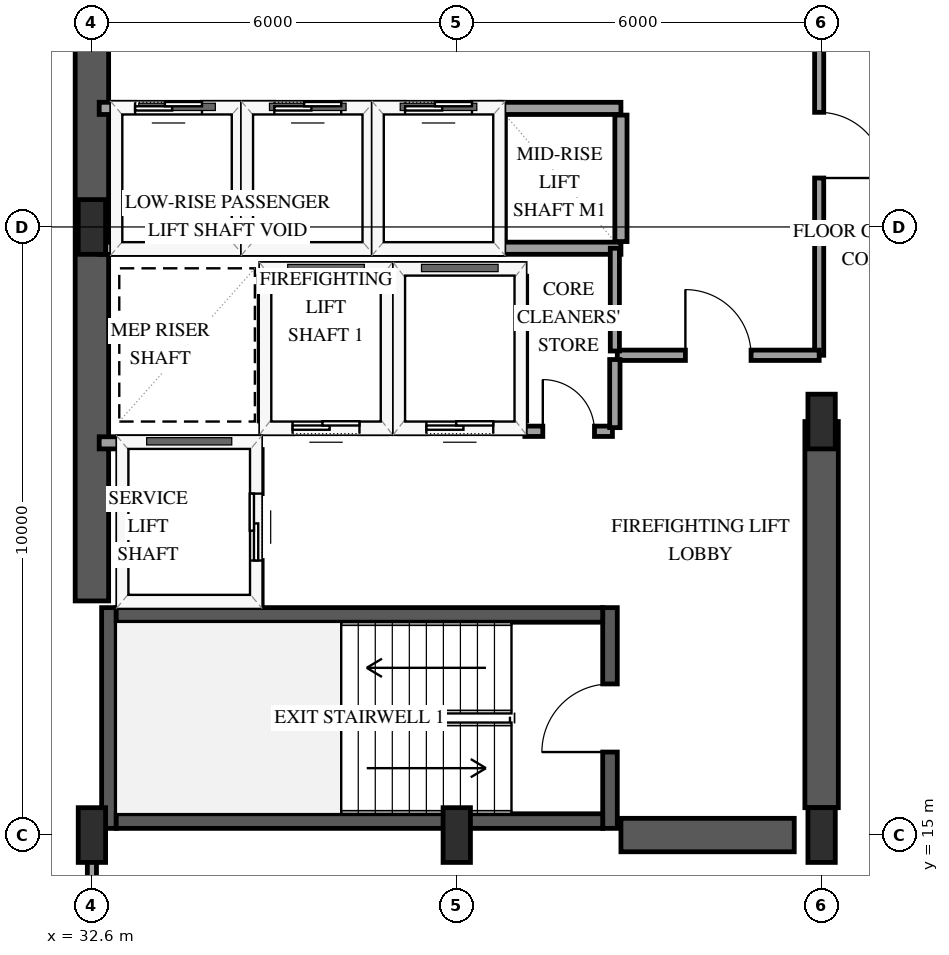
"""IFC4 building model, lengths in metres.
Left out: names, types, materials, properties, quantities, classifications, styles, units other than length and angle.
Written with IfcOpenShell. Run it as: python <this file> out.ifc"""

import sys

from ifc_helpers import new_model, si_unit, direction, frame, frame_2d, origin, origin_2d, place, context, subcontext, project, spatial, rectangle, extrude, element, fill, save


model = new_model("IFC4")
c1 = context("Model", 3, precision=1e-05, world=origin(), true_north=direction((0.0, 1.0)))
c2 = subcontext(c1, "Body", "Model", "MODEL_VIEW")
j1 = project(units=[si_unit("LENGTHUNIT", "METRE"), si_unit("PLANEANGLEUNIT", "RADIAN")], contexts=[c1])
p1 = place(None, origin())
s1 = spatial("IfcSite", under=j1, at=p1, CompositionType="ELEMENT")
p2 = place(p1, origin())
s2 = spatial("IfcBuilding", under=s1, at=p2, CompositionType="ELEMENT")
p3 = place(p2, frame((0.0, 0.0, 130.3)))
s3 = spatial("IfcBuildingStorey", under=s2, at=p3, CompositionType="ELEMENT", Elevation=130.3)
p4 = place(p3, frame((32.88, 15.11, 0.0), z_axis=(0.0, 0.0, 1.0), x_axis=(0.0, 1.0, 0.0)))
e1 = element("IfcWall", 1, at=p4, inside=s3, PredefinedType="SHEAR", context=c2, shape_type="SweptSolid", body=[
    extrude(rectangle(XDim=3.63, YDim=0.24, at=frame_2d((1.815, 0.0))), origin(), (0.0, 0.0, 1.0), 3.9),
])
p5 = place(p3, frame((41.12, 15.11, 0.0), z_axis=(0.0, 0.0, 1.0), x_axis=(0.0, 1.0, 0.0)))
e2 = element("IfcWall", 2, at=p5, inside=s3, PredefinedType="SHEAR", context=c2, shape_type="SweptSolid", body=[
    extrude(rectangle(XDim=3.63, YDim=0.24, at=frame_2d((1.815, 0.0))), origin(), (0.0, 0.0, 1.0), 3.9),
])
p6 = place(p5, frame((1.255, 0.0, 0.0)))
e3 = element("IfcOpeningElement", 3, at=p6, cuts=e2, PredefinedType="OPENING", context=c2, shape_type="SweptSolid", body=[
    extrude(rectangle(XDim=1.12, YDim=2.15, at=frame_2d((0.56, 1.075))), frame((0.0, 0.13, 0.0), z_axis=(0.0, -1.0, 0.0), x_axis=(1.0, 0.0, 0.0)), (0.0, 0.0, 1.0), 0.26),
])
for number, where, z_axis, x_axis in (
    (4, (33.0, 15.23, 0.0), (0.0, 0.0, 1.0), (1.0, 0.0, 0.0)),
    (5, (33.0, 18.62, 0.0), (0.0, 0.0, 1.0), (1.0, 0.0, 0.0)),
):
    element("IfcWall", number, at=place(p3, frame(where, z_axis=z_axis, x_axis=x_axis)), inside=s3, PredefinedType="SHEAR", context=c2, shape_type="SweptSolid", body=[
        extrude(rectangle(XDim=8.0, YDim=0.24, at=frame_2d((4.0, 0.0))), origin(), (0.0, 0.0, 1.0), 3.9),
    ])
p7 = place(p3, frame((32.6, 18.85, 0.0), z_axis=(0.0, 0.0, 1.0), x_axis=(0.0, 1.0, 0.0)))
e6 = element("IfcWall", 6, at=p7, inside=s3, PredefinedType="SHEAR", context=c2, shape_type="SweptSolid", body=[
    extrude(rectangle(XDim=12.3, YDim=0.55, at=frame_2d((6.15, 0.0))), origin(), (0.0, 0.0, 1.0), 3.9),
])
p8 = place(p3, frame((41.3, 15.0, 0.0), z_axis=(0.0, 0.0, 1.0), x_axis=(1.0, 0.0, 0.0)))
e7 = element("IfcWall", 7, at=p8, inside=s3, PredefinedType="SHEAR", context=c2, shape_type="SweptSolid", body=[
    extrude(rectangle(XDim=2.85, YDim=0.55, at=frame_2d((1.425, 0.0))), origin(), (0.0, 0.0, 1.0), 3.9),
])
p9 = place(p3, frame((44.6, 15.45, 0.0), z_axis=(0.0, 0.0, 1.0), x_axis=(0.0, 1.0, 0.0)))
e8 = element("IfcWall", 8, at=p9, inside=s3, PredefinedType="SHEAR", context=c2, shape_type="SweptSolid", body=[
    extrude(rectangle(XDim=6.35, YDim=0.55, at=frame_2d((3.175, 0.0))), origin(), (0.0, 0.0, 1.0), 3.9),
])
for number, where, z_axis, x_axis in (
    (9, (32.6, 15.0, 0.0), (0.0, 0.0, 1.0), (1.0, 0.0, 0.0)),
    (10, (32.6, 25.0, 0.0), (0.0, 0.0, 1.0), (1.0, 0.0, 0.0)),
    (11, (38.6, 15.0, 0.0), (0.0, 0.0, 1.0), (1.0, 0.0, 0.0)),
    (12, (44.6, 15.0, 0.0), (0.0, 0.0, 1.0), (1.0, 0.0, 0.0)),
    (13, (44.6, 21.8, 0.0), (0.0, 0.0, 1.0), (1.0, 0.0, 0.0)),
):
    element("IfcColumn", number, at=place(p3, frame(where, z_axis=z_axis, x_axis=x_axis)), inside=s3, PredefinedType="PILASTER", context=c2, shape_type="SweptSolid", body=[
        extrude(rectangle(XDim=0.45, YDim=0.9, at=origin_2d()), origin(), (0.0, 0.0, 1.0), 3.9),
    ])
p10 = place(p3, frame((35.45, 21.7, 0.0), z_axis=(0.0, 0.0, 1.0), x_axis=(1.0, 0.0, 0.0)))
e14 = element("IfcWall", 14, at=p10, inside=s3, PredefinedType="SOLIDWALL", context=c2, shape_type="SweptSolid", body=[
    extrude(rectangle(XDim=2.0, YDim=0.2, at=frame_2d((1.0, 0.0))), origin(), (0.0, 0.0, 1.0), 3.56),
])
p11 = place(p10, frame((0.45, 0.0, 0.0)))
e15 = element("IfcOpeningElement", 15, at=p11, cuts=e14, PredefinedType="OPENING", context=c2, shape_type="SweptSolid", body=[
    extrude(rectangle(XDim=1.1, YDim=2.15, at=frame_2d((0.55, 1.075))), frame((0.0, 0.11, 0.0), z_axis=(0.0, -1.0, 0.0), x_axis=(1.0, 0.0, 0.0)), (0.0, 0.0, 1.0), 0.22),
])
p12 = place(p3, frame((35.45, 24.3, 0.0), z_axis=(0.0, 0.0, 1.0), x_axis=(1.0, 0.0, 0.0)))
e16 = element("IfcWall", 16, at=p12, inside=s3, PredefinedType="SOLIDWALL", context=c2, shape_type="SweptSolid", body=[
    extrude(rectangle(XDim=2.0, YDim=0.2, at=frame_2d((1.0, 0.0))), origin(), (0.0, 0.0, 1.0), 3.56),
])
for number, where, z_axis, x_axis in (
    (17, (35.45, 21.81, 0.0), (0.0, 0.0, 1.0), (0.0, 1.0, 0.0)),
    (18, (37.45, 21.81, 0.0), (0.0, 0.0, 1.0), (0.0, 1.0, 0.0)),
):
    element("IfcWall", number, at=place(p3, frame(where, z_axis=z_axis, x_axis=x_axis)), inside=s3, PredefinedType="SOLIDWALL", context=c2, shape_type="SweptSolid", body=[
        extrude(rectangle(XDim=2.38, YDim=0.2, at=frame_2d((1.19, 0.0))), origin(), (0.0, 0.0, 1.0), 3.56),
    ])
p13 = place(p3, frame((37.65, 21.7, 0.0), z_axis=(0.0, 0.0, 1.0), x_axis=(1.0, 0.0, 0.0)))
e19 = element("IfcWall", 19, at=p13, inside=s3, PredefinedType="SOLIDWALL", context=c2, shape_type="SweptSolid", body=[
    extrude(rectangle(XDim=2.0, YDim=0.2, at=frame_2d((1.0, 0.0))), origin(), (0.0, 0.0, 1.0), 3.56),
])
p14 = place(p13, frame((0.45, 0.0, 0.0)))
e20 = element("IfcOpeningElement", 20, at=p14, cuts=e19, PredefinedType="OPENING", context=c2, shape_type="SweptSolid", body=[
    extrude(rectangle(XDim=1.1, YDim=2.15, at=frame_2d((0.55, 1.075))), frame((0.0, 0.11, 0.0), z_axis=(0.0, -1.0, 0.0), x_axis=(1.0, 0.0, 0.0)), (0.0, 0.0, 1.0), 0.22),
])
p15 = place(p3, frame((37.65, 24.3, 0.0), z_axis=(0.0, 0.0, 1.0), x_axis=(1.0, 0.0, 0.0)))
e21 = element("IfcWall", 21, at=p15, inside=s3, PredefinedType="SOLIDWALL", context=c2, shape_type="SweptSolid", body=[
    extrude(rectangle(XDim=2.0, YDim=0.2, at=frame_2d((1.0, 0.0))), origin(), (0.0, 0.0, 1.0), 3.56),
])
p16 = place(p3, frame((39.65, 21.81, 0.0), z_axis=(0.0, 0.0, 1.0), x_axis=(0.0, 1.0, 0.0)))
e22 = element("IfcWall", 22, at=p16, inside=s3, PredefinedType="SOLIDWALL", context=c2, shape_type="SweptSolid", body=[
    extrude(rectangle(XDim=2.38, YDim=0.2, at=frame_2d((1.19, 0.0))), origin(), (0.0, 0.0, 1.0), 3.56),
])
p17 = place(p3, frame((32.72, 21.45, 0.0), z_axis=(0.0, 0.0, 1.0), x_axis=(1.0, 0.0, 0.0)))
e23 = element("IfcWall", 23, at=p17, inside=s3, PredefinedType="SOLIDWALL", context=c2, shape_type="SweptSolid", body=[
    extrude(rectangle(XDim=2.58, YDim=0.2, at=frame_2d((1.29, 0.0))), origin(), (0.0, 0.0, 1.0), 3.56),
])
p18 = place(p3, frame((35.3, 18.79, 0.0), z_axis=(0.0, 0.0, 1.0), x_axis=(0.0, 1.0, 0.0)))
e24 = element("IfcWall", 24, at=p18, inside=s3, PredefinedType="SOLIDWALL", context=c2, shape_type="SweptSolid", body=[
    extrude(rectangle(XDim=2.55, YDim=0.2, at=frame_2d((1.275, 0.0))), origin(), (0.0, 0.0, 1.0), 3.56),
])
p19 = place(p18, frame((0.725, 0.0, 0.0)))
e25 = element("IfcOpeningElement", 25, at=p19, cuts=e24, PredefinedType="OPENING", context=c2, shape_type="SweptSolid", body=[
    extrude(rectangle(XDim=1.1, YDim=2.15, at=frame_2d((0.55, 1.075))), frame((0.0, 0.11, 0.0), z_axis=(0.0, -1.0, 0.0), x_axis=(1.0, 0.0, 0.0)), (0.0, 0.0, 1.0), 0.22),
])
p20 = place(p3, frame((32.72, 24.65, 0.0), z_axis=(0.0, 0.0, 1.0), x_axis=(1.0, 0.0, 0.0)))
e26 = element("IfcWall", 26, at=p20, inside=s3, PredefinedType="SOLIDWALL", context=c2, shape_type="SweptSolid", body=[
    extrude(rectangle(XDim=2.28, YDim=0.2, at=frame_2d((1.14, 0.0))), origin(), (0.0, 0.0, 1.0), 3.56),
])
p21 = place(p3, frame((32.72, 26.95, 0.0), z_axis=(0.0, 0.0, 1.0), x_axis=(1.0, 0.0, 0.0)))
e27 = element("IfcWall", 27, at=p21, inside=s3, PredefinedType="SOLIDWALL", context=c2, shape_type="SweptSolid", body=[
    extrude(rectangle(XDim=2.28, YDim=0.2, at=frame_2d((1.14, 0.0))), origin(), (0.0, 0.0, 1.0), 3.56),
])
p22 = place(p21, frame((0.59, 0.0, 0.0)))
e28 = element("IfcOpeningElement", 28, at=p22, cuts=e27, PredefinedType="OPENING", context=c2, shape_type="SweptSolid", body=[
    extrude(rectangle(XDim=1.1, YDim=2.15, at=frame_2d((0.55, 1.075))), frame((0.0, 0.11, 0.0), z_axis=(0.0, -1.0, 0.0), x_axis=(1.0, 0.0, 0.0)), (0.0, 0.0, 1.0), 0.22),
])
p23 = place(p3, frame((35.0, 24.76, 0.0), z_axis=(0.0, 0.0, 1.0), x_axis=(0.0, 1.0, 0.0)))
e29 = element("IfcWall", 29, at=p23, inside=s3, PredefinedType="SOLIDWALL", context=c2, shape_type="SweptSolid", body=[
    extrude(rectangle(XDim=2.08, YDim=0.2, at=frame_2d((1.04, 0.0))), origin(), (0.0, 0.0, 1.0), 3.56),
])
p24 = place(p3, frame((35.15, 24.65, 0.0), z_axis=(0.0, 0.0, 1.0), x_axis=(1.0, 0.0, 0.0)))
e30 = element("IfcWall", 30, at=p24, inside=s3, PredefinedType="SOLIDWALL", context=c2, shape_type="SweptSolid", body=[
    extrude(rectangle(XDim=2.0, YDim=0.2, at=frame_2d((1.0, 0.0))), origin(), (0.0, 0.0, 1.0), 3.56),
])
p25 = place(p3, frame((35.15, 26.95, 0.0), z_axis=(0.0, 0.0, 1.0), x_axis=(1.0, 0.0, 0.0)))
e31 = element("IfcWall", 31, at=p25, inside=s3, PredefinedType="SOLIDWALL", context=c2, shape_type="SweptSolid", body=[
    extrude(rectangle(XDim=2.0, YDim=0.2, at=frame_2d((1.0, 0.0))), origin(), (0.0, 0.0, 1.0), 3.56),
])
p26 = place(p25, frame((0.45, 0.0, 0.0)))
e32 = element("IfcOpeningElement", 32, at=p26, cuts=e31, PredefinedType="OPENING", context=c2, shape_type="SweptSolid", body=[
    extrude(rectangle(XDim=1.1, YDim=2.15, at=frame_2d((0.55, 1.075))), frame((0.0, 0.11, 0.0), z_axis=(0.0, -1.0, 0.0), x_axis=(1.0, 0.0, 0.0)), (0.0, 0.0, 1.0), 0.22),
])
p27 = place(p3, frame((37.15, 24.76, 0.0), z_axis=(0.0, 0.0, 1.0), x_axis=(0.0, 1.0, 0.0)))
e33 = element("IfcWall", 33, at=p27, inside=s3, PredefinedType="SOLIDWALL", context=c2, shape_type="SweptSolid", body=[
    extrude(rectangle(XDim=2.08, YDim=0.2, at=frame_2d((1.04, 0.0))), origin(), (0.0, 0.0, 1.0), 3.56),
])
p28 = place(p3, frame((37.3, 24.65, 0.0), z_axis=(0.0, 0.0, 1.0), x_axis=(1.0, 0.0, 0.0)))
e34 = element("IfcWall", 34, at=p28, inside=s3, PredefinedType="SOLIDWALL", context=c2, shape_type="SweptSolid", body=[
    extrude(rectangle(XDim=2.0, YDim=0.2, at=frame_2d((1.0, 0.0))), origin(), (0.0, 0.0, 1.0), 3.56),
])
p29 = place(p3, frame((37.3, 26.95, 0.0), z_axis=(0.0, 0.0, 1.0), x_axis=(1.0, 0.0, 0.0)))
e35 = element("IfcWall", 35, at=p29, inside=s3, PredefinedType="SOLIDWALL", context=c2, shape_type="SweptSolid", body=[
    extrude(rectangle(XDim=2.0, YDim=0.2, at=frame_2d((1.0, 0.0))), origin(), (0.0, 0.0, 1.0), 3.56),
])
p30 = place(p29, frame((0.45, 0.0, 0.0)))
e36 = element("IfcOpeningElement", 36, at=p30, cuts=e35, PredefinedType="OPENING", context=c2, shape_type="SweptSolid", body=[
    extrude(rectangle(XDim=1.1, YDim=2.15, at=frame_2d((0.55, 1.075))), frame((0.0, 0.11, 0.0), z_axis=(0.0, -1.0, 0.0), x_axis=(1.0, 0.0, 0.0)), (0.0, 0.0, 1.0), 0.22),
])
p31 = place(p3, frame((39.3, 24.76, 0.0), z_axis=(0.0, 0.0, 1.0), x_axis=(0.0, 1.0, 0.0)))
e37 = element("IfcWall", 37, at=p31, inside=s3, PredefinedType="SOLIDWALL", context=c2, shape_type="SweptSolid", body=[
    extrude(rectangle(XDim=2.08, YDim=0.2, at=frame_2d((1.04, 0.0))), origin(), (0.0, 0.0, 1.0), 3.56),
])
for number, where, z_axis, x_axis in (
    (38, (39.3, 24.65, 0.0), (0.0, 0.0, 1.0), (1.0, 0.0, 0.0)),
    (39, (39.3, 26.95, 0.0), (0.0, 0.0, 1.0), (1.0, 0.0, 0.0)),
):
    element("IfcWall", number, at=place(p3, frame(where, z_axis=z_axis, x_axis=x_axis)), inside=s3, PredefinedType="SOLIDWALL", context=c2, shape_type="SweptSolid", body=[
        extrude(rectangle(XDim=2.0, YDim=0.2, at=frame_2d((1.0, 0.0))), origin(), (0.0, 0.0, 1.0), 3.56),
    ])
p32 = place(p3, frame((41.3, 24.76, 0.0), z_axis=(0.0, 0.0, 1.0), x_axis=(0.0, 1.0, 0.0)))
e40 = element("IfcWall", 40, at=p32, inside=s3, PredefinedType="SOLIDWALL", context=c2, shape_type="SweptSolid", body=[
    extrude(rectangle(XDim=2.08, YDim=0.2, at=frame_2d((1.04, 0.0))), origin(), (0.0, 0.0, 1.0), 3.56),
])
p33 = place(p3, frame((44.56, 29.8, 0.0), z_axis=(0.0, 0.0, 1.0), x_axis=(0.0, -1.0, 0.0)))
e41 = element("IfcWall", 41, at=p33, inside=s3, PredefinedType="PARTITIONING", context=c2, shape_type="SweptSolid", body=[
    extrude(rectangle(XDim=6.91, YDim=0.15, at=frame_2d((3.455, 0.0))), origin(), (0.0, 0.0, 1.0), 2.6),
])
p34 = place(p33, frame((2.915, 0.0, 0.0)))
e42 = element("IfcOpeningElement", 42, at=p34, cuts=e41, PredefinedType="OPENING", context=c2, shape_type="SweptSolid", body=[
    extrude(rectangle(XDim=1.08, YDim=2.15, at=frame_2d((0.54, 1.075))), frame((0.0, 0.085, 0.0), z_axis=(0.0, -1.0, 0.0), x_axis=(1.0, 0.0, 0.0)), (0.0, 0.0, 1.0), 0.17),
])
p35 = place(p3, frame((41.24, 22.89, 0.0), z_axis=(0.0, 0.0, 1.0), x_axis=(1.0, 0.0, 0.0)))
e43 = element("IfcWall", 43, at=p35, inside=s3, PredefinedType="PARTITIONING", context=c2, shape_type="SweptSolid", body=[
    extrude(rectangle(XDim=3.32, YDim=0.17, at=frame_2d((1.66, 0.0))), origin(), (0.0, 0.0, 1.0), 3.56),
])
p36 = place(p35, frame((1.12, 0.0, 0.0)))
e44 = element("IfcOpeningElement", 44, at=p36, cuts=e43, PredefinedType="OPENING", context=c2, shape_type="SweptSolid", body=[
    extrude(rectangle(XDim=1.08, YDim=2.15, at=frame_2d((0.54, 1.075))), frame((0.0, 0.095, 0.0), z_axis=(0.0, -1.0, 0.0), x_axis=(1.0, 0.0, 0.0)), (0.0, 0.0, 1.0), 0.19),
])
p37 = place(p3, frame((32.6, 12.38, 0.0), z_axis=(0.0, 0.0, 1.0), x_axis=(0.0, 1.0, 0.0)))
e45 = element("IfcWall", 45, at=p37, inside=s3, PredefinedType="PARTITIONING", context=c2, shape_type="SweptSolid", body=[
    extrude(rectangle(XDim=2.55, YDim=0.15, at=frame_2d((1.275, 0.0))), origin(), (0.0, 0.0, 1.0), 3.56),
])
p38 = place(p3, frame((41.2, 22.96, 0.0), z_axis=(0.0, 0.0, 1.0), x_axis=(0.0, 1.0, 0.0)))
e46 = element("IfcWall", 46, at=p38, inside=s3, PredefinedType="PARTITIONING", context=c2, shape_type="SweptSolid", body=[
    extrude(rectangle(XDim=1.69, YDim=0.15, at=frame_2d((0.845, 0.0))), origin(), (0.0, 0.0, 1.0), 3.56),
])
p39 = place(p3, frame((39.72, 21.64, 0.0), z_axis=(0.0, 0.0, 1.0), x_axis=(1.0, 0.0, 0.0)))
e47 = element("IfcWall", 47, at=p39, inside=s3, PredefinedType="PARTITIONING", context=c2, shape_type="SweptSolid", body=[
    extrude(rectangle(XDim=1.44, YDim=0.17, at=frame_2d((0.72, 0.0))), origin(), (0.0, 0.0, 1.0), 3.56),
])
p40 = place(p39, frame((0.295, 0.0, 0.0)))
e48 = element("IfcOpeningElement", 48, at=p40, cuts=e47, PredefinedType="OPENING", context=c2, shape_type="SweptSolid", body=[
    extrude(rectangle(XDim=0.85, YDim=2.1, at=frame_2d((0.425, 1.05))), frame((0.0, 0.095, 0.0), z_axis=(0.0, -1.0, 0.0), x_axis=(1.0, 0.0, 0.0)), (0.0, 0.0, 1.0), 0.19),
])
p41 = place(p3, frame((41.2, 21.7, 0.0), z_axis=(0.0, 0.0, 1.0), x_axis=(0.0, 1.0, 0.0)))
e49 = element("IfcWall", 49, at=p41, inside=s3, PredefinedType="PARTITIONING", context=c2, shape_type="SweptSolid", body=[
    extrude(rectangle(XDim=1.12, YDim=0.17, at=frame_2d((0.56, 0.0))), origin(), (0.0, 0.0, 1.0), 3.56),
])
p42 = place(p11, origin())
e50 = element("IfcDoor", 50, at=p42, inside=s3, OperationType="SLIDING_TO_LEFT", PredefinedType="DOOR", context=c2, shape_type="SweptSolid", body=[
    extrude(rectangle(XDim=1.1, YDim=2.15, at=frame_2d((0.55, 1.075))), frame((0.0, 0.025, 0.0), z_axis=(0.0, -1.0, 0.0), x_axis=(1.0, 0.0, 0.0)), (0.0, 0.0, 1.0), 0.05),
])
fill(e15, e50)
p43 = place(p14, origin())
e51 = element("IfcDoor", 51, at=p43, inside=s3, OperationType="SLIDING_TO_LEFT", PredefinedType="DOOR", context=c2, shape_type="SweptSolid", body=[
    extrude(rectangle(XDim=1.1, YDim=2.15, at=frame_2d((0.55, 1.075))), frame((0.0, 0.025, 0.0), z_axis=(0.0, -1.0, 0.0), x_axis=(1.0, 0.0, 0.0)), (0.0, 0.0, 1.0), 0.05),
])
fill(e20, e51)
p44 = place(p19, origin())
e52 = element("IfcDoor", 52, at=p44, inside=s3, OperationType="SLIDING_TO_LEFT", PredefinedType="DOOR", context=c2, shape_type="SweptSolid", body=[
    extrude(rectangle(XDim=1.1, YDim=2.15, at=frame_2d((0.55, 1.075))), frame((0.0, 0.025, 0.0), z_axis=(0.0, -1.0, 0.0), x_axis=(1.0, 0.0, 0.0)), (0.0, 0.0, 1.0), 0.05),
])
fill(e25, e52)
p45 = place(p22, origin())
e53 = element("IfcDoor", 53, at=p45, inside=s3, OperationType="SLIDING_TO_LEFT", PredefinedType="DOOR", context=c2, shape_type="SweptSolid", body=[
    extrude(rectangle(XDim=1.1, YDim=2.15, at=frame_2d((0.55, 1.075))), frame((0.0, 0.025, 0.0), z_axis=(0.0, -1.0, 0.0), x_axis=(1.0, 0.0, 0.0)), (0.0, 0.0, 1.0), 0.05),
])
fill(e28, e53)
p46 = place(p26, origin())
e54 = element("IfcDoor", 54, at=p46, inside=s3, OperationType="SLIDING_TO_LEFT", PredefinedType="DOOR", context=c2, shape_type="SweptSolid", body=[
    extrude(rectangle(XDim=1.1, YDim=2.15, at=frame_2d((0.55, 1.075))), frame((0.0, 0.025, 0.0), z_axis=(0.0, -1.0, 0.0), x_axis=(1.0, 0.0, 0.0)), (0.0, 0.0, 1.0), 0.05),
])
fill(e32, e54)
p47 = place(p30, origin())
e55 = element("IfcDoor", 55, at=p47, inside=s3, OperationType="SLIDING_TO_LEFT", PredefinedType="DOOR", context=c2, shape_type="SweptSolid", body=[
    extrude(rectangle(XDim=1.1, YDim=2.15, at=frame_2d((0.55, 1.075))), frame((0.0, 0.025, 0.0), z_axis=(0.0, -1.0, 0.0), x_axis=(1.0, 0.0, 0.0)), (0.0, 0.0, 1.0), 0.05),
])
fill(e36, e55)
p48 = place(p6, origin())
e56 = element("IfcDoor", 56, at=p48, inside=s3, OperationType="SINGLE_SWING_LEFT", PredefinedType="DOOR", context=c2, shape_type="SweptSolid", body=[
    extrude(rectangle(XDim=1.12, YDim=2.15, at=frame_2d((0.56, 1.075))), frame((0.0, 0.025, 0.0), z_axis=(0.0, -1.0, 0.0), x_axis=(1.0, 0.0, 0.0)), (0.0, 0.0, 1.0), 0.05),
])
fill(e3, e56)
p49 = place(p34, origin())
e57 = element("IfcDoor", 57, at=p49, inside=s3, OperationType="SINGLE_SWING_RIGHT", PredefinedType="DOOR", context=c2, shape_type="SweptSolid", body=[
    extrude(rectangle(XDim=1.08, YDim=2.15, at=frame_2d((0.54, 1.075))), frame((0.0, 0.025, 0.0), z_axis=(0.0, -1.0, 0.0), x_axis=(1.0, 0.0, 0.0)), (0.0, 0.0, 1.0), 0.05),
])
fill(e42, e57)
p50 = place(p36, origin())
e58 = element("IfcDoor", 58, at=p50, inside=s3, OperationType="SINGLE_SWING_LEFT", PredefinedType="DOOR", context=c2, shape_type="SweptSolid", body=[
    extrude(rectangle(XDim=1.08, YDim=2.15, at=frame_2d((0.54, 1.075))), frame((0.0, 0.025, 0.0), z_axis=(0.0, -1.0, 0.0), x_axis=(1.0, 0.0, 0.0)), (0.0, 0.0, 1.0), 0.05),
])
fill(e44, e58)
p51 = place(p40, origin())
e59 = element("IfcDoor", 59, at=p51, inside=s3, OperationType="SINGLE_SWING_LEFT", PredefinedType="DOOR", context=c2, shape_type="SweptSolid", body=[
    extrude(rectangle(XDim=0.85, YDim=2.1, at=frame_2d((0.425, 1.05))), frame((0.0, 0.025, 0.0), z_axis=(0.0, -1.0, 0.0), x_axis=(1.0, 0.0, 0.0)), (0.0, 0.0, 1.0), 0.05),
])
fill(e48, e59)
save(model, sys.argv[1])
